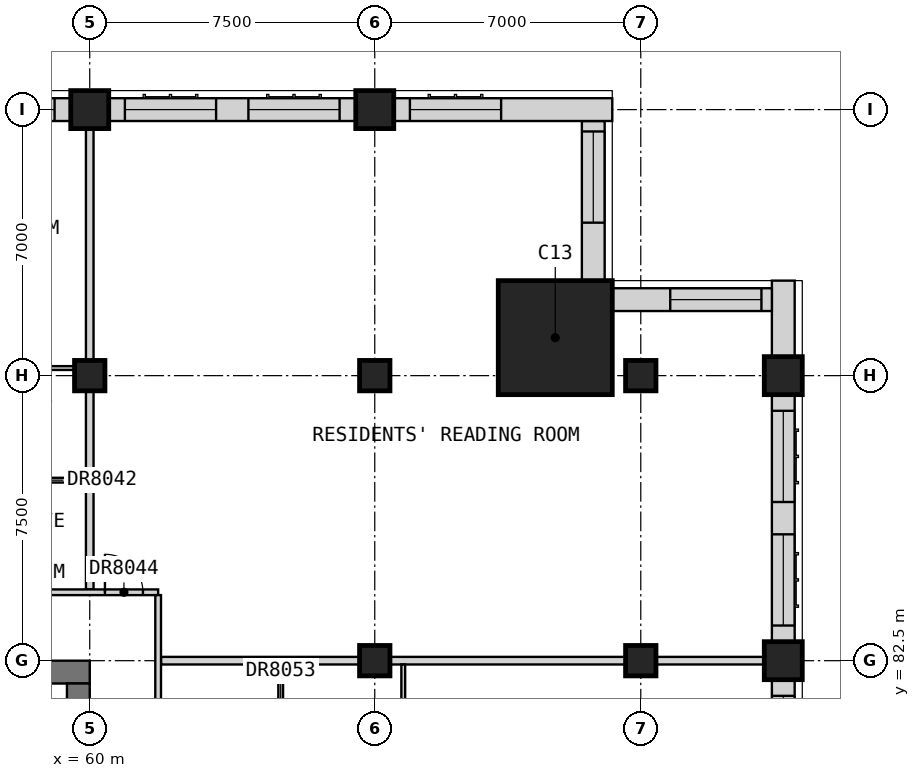
"""IFC4 building model, lengths in metres.
Left out: names, types, materials, properties, quantities, classifications, styles, units other than length and angle.
Written with IfcOpenShell. Run it as: python <this file> out.ifc"""

import sys

from ifc_helpers import new_model, si_unit, direction, frame, frame_2d, origin, origin_2d, place, context, subcontext, project, spatial, rectangle, extrude, element, fill, save


model = new_model("IFC4")
c1 = context("Model", 3, precision=1e-05, world=origin(), true_north=direction((0.0, 1.0)))
c2 = subcontext(c1, "Body", "Model", "MODEL_VIEW")
j1 = project(units=[si_unit("LENGTHUNIT", "METRE"), si_unit("PLANEANGLEUNIT", "RADIAN")], contexts=[c1])
p1 = place(None, origin())
s1 = spatial("IfcSite", under=j1, at=p1, CompositionType="ELEMENT")
p2 = place(p1, origin())
s2 = spatial("IfcBuilding", under=s1, at=p2, CompositionType="ELEMENT")
p3 = place(p2, frame((0.0, 0.0, 233.7)))
s3 = spatial("IfcBuildingStorey", under=s2, at=p3, CompositionType="ELEMENT", Elevation=233.7)
for number, where, z_axis, x_axis in (
    (1, (78.25, 82.5, 0.0), (0.0, 0.0, 1.0), (1.0, 0.0, 0.0)),
    (2, (78.25, 90.0, 0.0), (0.0, 0.0, 1.0), (1.0, 0.0, 0.0)),
):
    element("IfcColumn", number, at=place(p3, frame(where, z_axis=z_axis, x_axis=x_axis)), inside=s3, PredefinedType="COLUMN", context=c2, shape_type="SweptSolid", body=[
        extrude(rectangle(XDim=1.0, YDim=1.0, at=origin_2d()), origin(), (0.0, 0.0, 1.0), 3.5),
    ])
p4 = place(p3, frame((60.0, 90.0, 0.0), z_axis=(0.0, 0.0, 1.0), x_axis=(1.0, 0.0, 0.0)))
e3 = element("IfcColumn", 3, at=p4, inside=s3, PredefinedType="COLUMN", context=c2, shape_type="SweptSolid", body=[
    extrude(rectangle(XDim=0.8, YDim=0.8, at=origin_2d()), origin(), (0.0, 0.0, 1.0), 3.5),
])
p5 = place(p3, frame((60.0, 97.0, 0.0), z_axis=(0.0, 0.0, 1.0), x_axis=(1.0, 0.0, 0.0)))
e4 = element("IfcColumn", 4, at=p5, inside=s3, PredefinedType="COLUMN", context=c2, shape_type="SweptSolid", body=[
    extrude(rectangle(XDim=1.0, YDim=1.0, at=origin_2d()), origin(), (0.0, 0.0, 1.0), 3.5),
])
for number, where, z_axis, x_axis in (
    (5, (67.5, 82.5, 0.0), (0.0, 0.0, 1.0), (1.0, 0.0, 0.0)),
    (6, (67.5, 90.0, 0.0), (0.0, 0.0, 1.0), (1.0, 0.0, 0.0)),
):
    element("IfcColumn", number, at=place(p3, frame(where, z_axis=z_axis, x_axis=x_axis)), inside=s3, PredefinedType="COLUMN", context=c2, shape_type="SweptSolid", body=[
        extrude(rectangle(XDim=0.8, YDim=0.8, at=origin_2d()), origin(), (0.0, 0.0, 1.0), 3.5),
    ])
p6 = place(p3, frame((67.5, 97.0, 0.0), z_axis=(0.0, 0.0, 1.0), x_axis=(1.0, 0.0, 0.0)))
e7 = element("IfcColumn", 7, at=p6, inside=s3, PredefinedType="COLUMN", context=c2, shape_type="SweptSolid", body=[
    extrude(rectangle(XDim=1.0, YDim=1.0, at=origin_2d()), origin(), (0.0, 0.0, 1.0), 3.5),
])
for number, where, z_axis, x_axis in (
    (8, (74.5, 82.5, 0.0), (0.0, 0.0, 1.0), (1.0, 0.0, 0.0)),
    (9, (74.5, 90.0, 0.0), (0.0, 0.0, 1.0), (1.0, 0.0, 0.0)),
):
    element("IfcColumn", number, at=place(p3, frame(where, z_axis=z_axis, x_axis=x_axis)), inside=s3, PredefinedType="COLUMN", context=c2, shape_type="SweptSolid", body=[
        extrude(rectangle(XDim=0.8, YDim=0.8, at=origin_2d()), origin(), (0.0, 0.0, 1.0), 3.5),
    ])
p7 = place(p3, frame((72.25, 91.0, 0.0), z_axis=(0.0, 0.0, 1.0), x_axis=(1.0, 0.0, 0.0)))
e10 = element("IfcColumn", 10, at=p7, inside=s3, PredefinedType="COLUMN", context=c2, shape_type="SweptSolid", body=[
    extrude(rectangle(XDim=3.0, YDim=3.0, at=origin_2d()), origin(), (0.0, 0.0, 1.0), 3.5),
])
p8 = place(p3, frame((30.0, 82.2, 0.0), z_axis=(0.0, 0.0, 1.0), x_axis=(1.0, 0.0, 0.0)))
e11 = element("IfcWall", 11, at=p8, inside=s3, PredefinedType="SHEAR", context=c2, shape_type="SweptSolid", body=[
    extrude(rectangle(XDim=30.0, YDim=0.6, at=frame_2d((15.0, 0.0))), origin(), (0.0, 0.0, 1.0), 3.5),
])
p9 = place(p3, frame((59.7, 60.6, 0.0), z_axis=(0.0, 0.0, 1.0), x_axis=(0.0, 1.0, 0.0)))
e12 = element("IfcWall", 12, at=p9, inside=s3, PredefinedType="SHEAR", context=c2, shape_type="SweptSolid", body=[
    extrude(rectangle(XDim=21.3, YDim=0.6, at=frame_2d((10.65, 0.0))), origin(), (0.0, 0.0, 1.0), 3.5),
])
p10 = place(p9, frame((14.9, 0.0, 0.0)))
e13 = element("IfcOpeningElement", 13, at=p10, cuts=e12, PredefinedType="OPENING", context=c2, shape_type="SweptSolid", body=[
    extrude(rectangle(XDim=1.8, YDim=2.1, at=frame_2d((0.9, 1.05))), frame((0.0, 0.31, 0.0), z_axis=(0.0, -1.0, 0.0), x_axis=(1.0, 0.0, 0.0)), (0.0, 0.0, 1.0), 0.62),
])
p11 = place(p3, frame((78.25, 75.5, 0.0), z_axis=(0.0, 0.0, 1.0), x_axis=(0.0, 1.0, 0.0)))
e14 = element("IfcWall", 14, at=p11, inside=s3, PredefinedType="SOLIDWALL", context=c2, shape_type="SweptSolid", body=[
    extrude(rectangle(XDim=6.5, YDim=0.6, at=frame_2d((3.25, 0.0))), origin(), (0.0, 0.0, 1.0), 2.75),
])
p12 = place(p11, frame((0.425, 0.0, 0.8)))
e15 = element("IfcOpeningElement", 15, at=p12, cuts=e14, PredefinedType="OPENING", context=c2, shape_type="SweptSolid", body=[
    extrude(rectangle(XDim=2.4, YDim=1.8, at=frame_2d((1.2, 0.9))), frame((0.0, 0.31, 0.0), z_axis=(0.0, -1.0, 0.0), x_axis=(1.0, 0.0, 0.0)), (0.0, 0.0, 1.0), 0.62),
])
p13 = place(p11, frame((3.675, 0.0, 0.8)))
e16 = element("IfcOpeningElement", 16, at=p13, cuts=e14, PredefinedType="OPENING", context=c2, shape_type="SweptSolid", body=[
    extrude(rectangle(XDim=2.4, YDim=1.8, at=frame_2d((1.2, 0.9))), frame((0.0, 0.31, 0.0), z_axis=(0.0, -1.0, 0.0), x_axis=(1.0, 0.0, 0.0)), (0.0, 0.0, 1.0), 0.62),
])
p14 = place(p3, frame((78.25, 83.0, 0.0), z_axis=(0.0, 0.0, 1.0), x_axis=(0.0, 1.0, 0.0)))
e17 = element("IfcWall", 17, at=p14, inside=s3, PredefinedType="SOLIDWALL", context=c2, shape_type="SweptSolid", body=[
    extrude(rectangle(XDim=6.5, YDim=0.6, at=frame_2d((3.25, 0.0))), origin(), (0.0, 0.0, 1.0), 2.75),
])
p15 = place(p14, frame((0.425, 0.0, 0.8)))
e18 = element("IfcOpeningElement", 18, at=p15, cuts=e17, PredefinedType="OPENING", context=c2, shape_type="SweptSolid", body=[
    extrude(rectangle(XDim=2.4, YDim=1.8, at=frame_2d((1.2, 0.9))), frame((0.0, 0.31, 0.0), z_axis=(0.0, -1.0, 0.0), x_axis=(1.0, 0.0, 0.0)), (0.0, 0.0, 1.0), 0.62),
])
p16 = place(p14, frame((3.675, 0.0, 0.8)))
e19 = element("IfcOpeningElement", 19, at=p16, cuts=e17, PredefinedType="OPENING", context=c2, shape_type="SweptSolid", body=[
    extrude(rectangle(XDim=2.4, YDim=1.8, at=frame_2d((1.2, 0.9))), frame((0.0, 0.31, 0.0), z_axis=(0.0, -1.0, 0.0), x_axis=(1.0, 0.0, 0.0)), (0.0, 0.0, 1.0), 0.62),
])
p17 = place(p3, frame((78.25, 90.5, 0.0), z_axis=(0.0, 0.0, 1.0), x_axis=(0.0, 1.0, 0.0)))
e20 = element("IfcWall", 20, at=p17, inside=s3, PredefinedType="SOLIDWALL", context=c2, shape_type="SweptSolid", body=[
    extrude(rectangle(XDim=2.0, YDim=0.6, at=frame_2d((1.0, 0.0))), origin(), (0.0, 0.0, 1.0), 3.25),
])
p18 = place(p3, frame((77.95, 92.0, 0.0), z_axis=(0.0, 0.0, 1.0), x_axis=(-1.0, 0.0, 0.0)))
e21 = element("IfcWall", 21, at=p18, inside=s3, PredefinedType="SOLIDWALL", context=c2, shape_type="SweptSolid", body=[
    extrude(rectangle(XDim=4.2, YDim=0.6, at=frame_2d((2.1, 0.0))), origin(), (0.0, 0.0, 1.0), 3.25),
])
p19 = place(p18, frame((0.275, 0.0, 0.8)))
e22 = element("IfcOpeningElement", 22, at=p19, cuts=e21, PredefinedType="OPENING", context=c2, shape_type="SweptSolid", body=[
    extrude(rectangle(XDim=2.4, YDim=1.8, at=frame_2d((1.2, 0.9))), frame((0.0, 0.31, 0.0), z_axis=(0.0, -1.0, 0.0), x_axis=(1.0, 0.0, 0.0)), (0.0, 0.0, 1.0), 0.62),
])
p20 = place(p3, frame((73.25, 92.5, 0.0), z_axis=(0.0, 0.0, 1.0), x_axis=(0.0, 1.0, 0.0)))
e23 = element("IfcWall", 23, at=p20, inside=s3, PredefinedType="SOLIDWALL", context=c2, shape_type="SweptSolid", body=[
    extrude(rectangle(XDim=4.2, YDim=0.6, at=frame_2d((2.1, 0.0))), origin(), (0.0, 0.0, 1.0), 3.25),
])
p21 = place(p20, frame((1.525, 0.0, 0.8)))
e24 = element("IfcOpeningElement", 24, at=p21, cuts=e23, PredefinedType="OPENING", context=c2, shape_type="SweptSolid", body=[
    extrude(rectangle(XDim=2.4, YDim=1.8, at=frame_2d((1.2, 0.9))), frame((0.0, 0.31, 0.0), z_axis=(0.0, -1.0, 0.0), x_axis=(1.0, 0.0, 0.0)), (0.0, 0.0, 1.0), 0.62),
])
p22 = place(p3, frame((73.75, 97.0, 0.0), z_axis=(0.0, 0.0, 1.0), x_axis=(-1.0, 0.0, 0.0)))
e25 = element("IfcWall", 25, at=p22, inside=s3, PredefinedType="SOLIDWALL", context=c2, shape_type="SweptSolid", body=[
    extrude(rectangle(XDim=5.75, YDim=0.6, at=frame_2d((2.875, 0.0))), origin(), (0.0, 0.0, 1.0), 2.75),
])
p23 = place(p22, frame((2.925, 0.0, 0.8)))
e26 = element("IfcOpeningElement", 26, at=p23, cuts=e25, PredefinedType="OPENING", context=c2, shape_type="SweptSolid", body=[
    extrude(rectangle(XDim=2.4, YDim=1.8, at=frame_2d((1.2, 0.9))), frame((0.0, 0.31, 0.0), z_axis=(0.0, -1.0, 0.0), x_axis=(1.0, 0.0, 0.0)), (0.0, 0.0, 1.0), 0.62),
])
p24 = place(p3, frame((67.0, 97.0, 0.0), z_axis=(0.0, 0.0, 1.0), x_axis=(-1.0, 0.0, 0.0)))
e27 = element("IfcWall", 27, at=p24, inside=s3, PredefinedType="SOLIDWALL", context=c2, shape_type="SweptSolid", body=[
    extrude(rectangle(XDim=6.5, YDim=0.6, at=frame_2d((3.25, 0.0))), origin(), (0.0, 0.0, 1.0), 2.75),
])
p25 = place(p24, frame((3.675, 0.0, 0.8)))
e28 = element("IfcOpeningElement", 28, at=p25, cuts=e27, PredefinedType="OPENING", context=c2, shape_type="SweptSolid", body=[
    extrude(rectangle(XDim=2.4, YDim=1.8, at=frame_2d((1.2, 0.9))), frame((0.0, 0.31, 0.0), z_axis=(0.0, -1.0, 0.0), x_axis=(1.0, 0.0, 0.0)), (0.0, 0.0, 1.0), 0.62),
])
p26 = place(p24, frame((0.425, 0.0, 0.8)))
e29 = element("IfcOpeningElement", 29, at=p26, cuts=e27, PredefinedType="OPENING", context=c2, shape_type="SweptSolid", body=[
    extrude(rectangle(XDim=2.4, YDim=1.8, at=frame_2d((1.2, 0.9))), frame((0.0, 0.31, 0.0), z_axis=(0.0, -1.0, 0.0), x_axis=(1.0, 0.0, 0.0)), (0.0, 0.0, 1.0), 0.62),
])
p27 = place(p3, frame((59.5, 97.0, 0.0), z_axis=(0.0, 0.0, 1.0), x_axis=(-1.0, 0.0, 0.0)))
e30 = element("IfcWall", 30, at=p27, inside=s3, PredefinedType="SOLIDWALL", context=c2, shape_type="SweptSolid", body=[
    extrude(rectangle(XDim=6.5, YDim=0.6, at=frame_2d((3.25, 0.0))), origin(), (0.0, 0.0, 1.0), 2.75),
])
p28 = place(p27, frame((3.675, 0.0, 0.8)))
e31 = element("IfcOpeningElement", 31, at=p28, cuts=e30, PredefinedType="OPENING", context=c2, shape_type="SweptSolid", body=[
    extrude(rectangle(XDim=2.4, YDim=1.8, at=frame_2d((1.2, 0.9))), frame((0.0, 0.31, 0.0), z_axis=(0.0, -1.0, 0.0), x_axis=(1.0, 0.0, 0.0)), (0.0, 0.0, 1.0), 0.62),
])
p29 = place(p27, frame((0.425, 0.0, 0.8)))
e32 = element("IfcOpeningElement", 32, at=p29, cuts=e30, PredefinedType="OPENING", context=c2, shape_type="SweptSolid", body=[
    extrude(rectangle(XDim=2.4, YDim=1.8, at=frame_2d((1.2, 0.9))), frame((0.0, 0.31, 0.0), z_axis=(0.0, -1.0, 0.0), x_axis=(1.0, 0.0, 0.0)), (0.0, 0.0, 1.0), 0.62),
])
p30 = place(p3, frame((61.875, 82.5, 0.0), z_axis=(0.0, 0.0, 1.0), x_axis=(1.0, 0.0, 0.0)))
e33 = element("IfcWall", 33, at=p30, inside=s3, PredefinedType="PARTITIONING", context=c2, shape_type="SweptSolid", body=[
    extrude(rectangle(XDim=16.875, YDim=0.2, at=frame_2d((8.438, 0.0))), origin(), (0.0, 0.0, 1.0), 3.25),
])
p31 = place(p3, frame((60.0, 84.375, 0.0), z_axis=(0.0, 0.0, 1.0), x_axis=(0.0, 1.0, 0.0)))
e34 = element("IfcWall", 34, at=p31, inside=s3, PredefinedType="PARTITIONING", context=c2, shape_type="SweptSolid", body=[
    extrude(rectangle(XDim=13.125, YDim=0.2, at=frame_2d((6.562, 0.0))), origin(), (0.0, 0.0, 1.0), 3.25),
])
p32 = place(p3, frame((33.85, 84.3, 0.0), z_axis=(0.0, 0.0, 1.0), x_axis=(1.0, 0.0, 0.0)))
e35 = element("IfcWall", 35, at=p32, inside=s3, PredefinedType="PARTITIONING", context=c2, shape_type="SweptSolid", body=[
    extrude(rectangle(XDim=27.95, YDim=0.15, at=frame_2d((13.975, 0.0))), origin(), (0.0, 0.0, 1.0), 3.25),
])
p33 = place(p32, frame((1.325, 0.0, 0.0)))
e36 = element("IfcOpeningElement", 36, at=p33, cuts=e35, PredefinedType="OPENING", context=c2, shape_type="SweptSolid", body=[
    extrude(rectangle(XDim=0.9, YDim=2.1, at=frame_2d((0.45, 1.05))), frame((0.0, 0.085, 0.0), z_axis=(0.0, -1.0, 0.0), x_axis=(1.0, 0.0, 0.0)), (0.0, 0.0, 1.0), 0.17),
])
p34 = place(p32, frame((8.825, 0.0, 0.0)))
e37 = element("IfcOpeningElement", 37, at=p34, cuts=e35, PredefinedType="OPENING", context=c2, shape_type="SweptSolid", body=[
    extrude(rectangle(XDim=0.9, YDim=2.1, at=frame_2d((0.45, 1.05))), frame((0.0, 0.085, 0.0), z_axis=(0.0, -1.0, 0.0), x_axis=(1.0, 0.0, 0.0)), (0.0, 0.0, 1.0), 0.17),
])
p35 = place(p32, frame((16.325, 0.0, 0.0)))
e38 = element("IfcOpeningElement", 38, at=p35, cuts=e35, PredefinedType="OPENING", context=c2, shape_type="SweptSolid", body=[
    extrude(rectangle(XDim=0.9, YDim=2.1, at=frame_2d((0.45, 1.05))), frame((0.0, 0.085, 0.0), z_axis=(0.0, -1.0, 0.0), x_axis=(1.0, 0.0, 0.0)), (0.0, 0.0, 1.0), 0.17),
])
p36 = place(p32, frame((26.55, 0.0, 0.0)))
e39 = element("IfcOpeningElement", 39, at=p36, cuts=e35, PredefinedType="OPENING", context=c2, shape_type="SweptSolid", body=[
    extrude(rectangle(XDim=1.0, YDim=2.1, at=frame_2d((0.5, 1.05))), frame((0.0, 0.085, 0.0), z_axis=(0.0, -1.0, 0.0), x_axis=(1.0, 0.0, 0.0)), (0.0, 0.0, 1.0), 0.17),
])
p37 = place(p3, frame((61.8, 58.275, 0.0), z_axis=(0.0, 0.0, 1.0), x_axis=(0.0, 1.0, 0.0)))
e40 = element("IfcWall", 40, at=p37, inside=s3, PredefinedType="PARTITIONING", context=c2, shape_type="SweptSolid", body=[
    extrude(rectangle(XDim=25.95, YDim=0.15, at=frame_2d((12.975, 0.0))), origin(), (0.0, 0.0, 1.0), 3.25),
])
p38 = place(p37, frame((4.575, 0.0, 0.0)))
e41 = element("IfcOpeningElement", 41, at=p38, cuts=e40, PredefinedType="OPENING", context=c2, shape_type="SweptSolid", body=[
    extrude(rectangle(XDim=1.8, YDim=2.1, at=frame_2d((0.9, 1.05))), frame((0.0, 0.085, 0.0), z_axis=(0.0, -1.0, 0.0), x_axis=(1.0, 0.0, 0.0)), (0.0, 0.0, 1.0), 0.17),
])
p39 = place(p37, frame((14.4, 0.0, 0.0)))
e42 = element("IfcOpeningElement", 42, at=p39, cuts=e40, PredefinedType="OPENING", context=c2, shape_type="SweptSolid", body=[
    extrude(rectangle(XDim=0.9, YDim=2.1, at=frame_2d((0.45, 1.05))), frame((0.0, 0.085, 0.0), z_axis=(0.0, -1.0, 0.0), x_axis=(1.0, 0.0, 0.0)), (0.0, 0.0, 1.0), 0.17),
])
p40 = place(p3, frame((33.85, 90.2, 0.0), z_axis=(0.0, 0.0, 1.0), x_axis=(1.0, 0.0, 0.0)))
e43 = element("IfcWall", 43, at=p40, inside=s3, PredefinedType="PARTITIONING", context=c2, shape_type="SweptSolid", body=[
    extrude(rectangle(XDim=26.05, YDim=0.1, at=frame_2d((13.025, 0.0))), origin(), (0.0, 0.0, 1.0), 3.25),
])
p41 = place(p40, frame((0.175, 0.0, 0.0)))
e44 = element("IfcOpeningElement", 44, at=p41, cuts=e43, PredefinedType="OPENING", context=c2, shape_type="SweptSolid", body=[
    extrude(rectangle(XDim=0.9, YDim=2.1, at=frame_2d((0.45, 1.05))), frame((0.0, 0.06, 0.0), z_axis=(0.0, -1.0, 0.0), x_axis=(1.0, 0.0, 0.0)), (0.0, 0.0, 1.0), 0.12),
])
p42 = place(p40, frame((8.825, 0.0, 0.0)))
e45 = element("IfcOpeningElement", 45, at=p42, cuts=e43, PredefinedType="OPENING", context=c2, shape_type="SweptSolid", body=[
    extrude(rectangle(XDim=0.9, YDim=2.1, at=frame_2d((0.45, 1.05))), frame((0.0, 0.06, 0.0), z_axis=(0.0, -1.0, 0.0), x_axis=(1.0, 0.0, 0.0)), (0.0, 0.0, 1.0), 0.12),
])
p43 = place(p40, frame((16.325, 0.0, 0.0)))
e46 = element("IfcOpeningElement", 46, at=p43, cuts=e43, PredefinedType="OPENING", context=c2, shape_type="SweptSolid", body=[
    extrude(rectangle(XDim=0.9, YDim=2.1, at=frame_2d((0.45, 1.05))), frame((0.0, 0.06, 0.0), z_axis=(0.0, -1.0, 0.0), x_axis=(1.0, 0.0, 0.0)), (0.0, 0.0, 1.0), 0.12),
])
p44 = place(p40, frame((23.825, 0.0, 0.0)))
e47 = element("IfcOpeningElement", 47, at=p44, cuts=e43, PredefinedType="OPENING", context=c2, shape_type="SweptSolid", body=[
    extrude(rectangle(XDim=0.9, YDim=2.1, at=frame_2d((0.45, 1.05))), frame((0.0, 0.06, 0.0), z_axis=(0.0, -1.0, 0.0), x_axis=(1.0, 0.0, 0.0)), (0.0, 0.0, 1.0), 0.12),
])
p45 = place(p3, frame((68.25, 67.6, 0.0), z_axis=(0.0, 0.0, 1.0), x_axis=(0.0, 1.0, 0.0)))
e48 = element("IfcWall", 48, at=p45, inside=s3, PredefinedType="PARTITIONING", context=c2, shape_type="SweptSolid", body=[
    extrude(rectangle(XDim=14.8, YDim=0.1, at=frame_2d((7.4, 0.0))), origin(), (0.0, 0.0, 1.0), 3.25),
])
p46 = place(p45, frame((1.325, 0.0, 0.0)))
e49 = element("IfcOpeningElement", 49, at=p46, cuts=e48, PredefinedType="OPENING", context=c2, shape_type="SweptSolid", body=[
    extrude(rectangle(XDim=0.9, YDim=2.1, at=frame_2d((0.45, 1.05))), frame((0.0, 0.06, 0.0), z_axis=(0.0, -1.0, 0.0), x_axis=(1.0, 0.0, 0.0)), (0.0, 0.0, 1.0), 0.12),
])
p47 = place(p45, frame((5.075, 0.0, 0.0)))
e50 = element("IfcOpeningElement", 50, at=p47, cuts=e48, PredefinedType="OPENING", context=c2, shape_type="SweptSolid", body=[
    extrude(rectangle(XDim=0.9, YDim=2.1, at=frame_2d((0.45, 1.05))), frame((0.0, 0.06, 0.0), z_axis=(0.0, -1.0, 0.0), x_axis=(1.0, 0.0, 0.0)), (0.0, 0.0, 1.0), 0.12),
])
p48 = place(p45, frame((12.575, 0.0, 0.0)))
e51 = element("IfcOpeningElement", 51, at=p48, cuts=e48, PredefinedType="OPENING", context=c2, shape_type="SweptSolid", body=[
    extrude(rectangle(XDim=0.9, YDim=2.1, at=frame_2d((0.45, 1.05))), frame((0.0, 0.06, 0.0), z_axis=(0.0, -1.0, 0.0), x_axis=(1.0, 0.0, 0.0)), (0.0, 0.0, 1.0), 0.12),
])
p49 = place(p3, frame((52.5, 87.25, 0.0), z_axis=(0.0, 0.0, 1.0), x_axis=(1.0, 0.0, 0.0)))
e52 = element("IfcWall", 52, at=p49, inside=s3, PredefinedType="PARTITIONING", context=c2, shape_type="SweptSolid", body=[
    extrude(rectangle(XDim=7.4, YDim=0.125, at=frame_2d((3.7, 0.0))), origin(), (0.0, 0.0, 1.0), 3.25),
])
p50 = place(p49, frame((5.175, 0.0, 0.0)))
e53 = element("IfcOpeningElement", 53, at=p50, cuts=e52, PredefinedType="OPENING", context=c2, shape_type="SweptSolid", body=[
    extrude(rectangle(XDim=0.9, YDim=2.1, at=frame_2d((0.45, 1.05))), frame((0.0, 0.073, 0.0), z_axis=(0.0, -1.0, 0.0), x_axis=(1.0, 0.0, 0.0)), (0.0, 0.0, 1.0), 0.145),
])
p51 = place(p3, frame((65.025, 75.062, 0.0), z_axis=(0.0, 0.0, 1.0), x_axis=(0.0, 1.0, 0.0)))
e54 = element("IfcWall", 54, at=p51, inside=s3, PredefinedType="PARTITIONING", context=c2, shape_type="SweptSolid", body=[
    extrude(rectangle(XDim=7.337, YDim=0.125, at=frame_2d((3.669, 0.0))), origin(), (0.0, 0.0, 1.0), 3.25),
])
p52 = place(p51, frame((5.113, 0.0, 0.0)))
e55 = element("IfcOpeningElement", 55, at=p52, cuts=e54, PredefinedType="OPENING", context=c2, shape_type="SweptSolid", body=[
    extrude(rectangle(XDim=0.9, YDim=2.1, at=frame_2d((0.45, 1.05))), frame((0.0, 0.073, 0.0), z_axis=(0.0, -1.0, 0.0), x_axis=(1.0, 0.0, 0.0)), (0.0, 0.0, 1.0), 0.145),
])
p53 = place(p13, origin())
e56 = element("IfcWindow", 56, at=p53, inside=s3, PartitioningType="SINGLE_PANEL", PredefinedType="WINDOW", context=c2, shape_type="SweptSolid", body=[
    extrude(rectangle(XDim=2.4, YDim=1.8, at=frame_2d((1.2, 0.9))), frame((0.0, -0.07, 0.0), z_axis=(0.0, -1.0, 0.0), x_axis=(1.0, 0.0, 0.0)), (0.0, 0.0, 1.0), 0.06),
])
fill(e16, e56)
p54 = place(p15, origin())
e57 = element("IfcWindow", 57, at=p54, inside=s3, PartitioningType="SINGLE_PANEL", PredefinedType="WINDOW", context=c2, shape_type="SweptSolid", body=[
    extrude(rectangle(XDim=2.4, YDim=1.8, at=frame_2d((1.2, 0.9))), frame((0.0, -0.07, 0.0), z_axis=(0.0, -1.0, 0.0), x_axis=(1.0, 0.0, 0.0)), (0.0, 0.0, 1.0), 0.06),
])
fill(e18, e57)
p55 = place(p16, origin())
e58 = element("IfcWindow", 58, at=p55, inside=s3, PartitioningType="SINGLE_PANEL", PredefinedType="WINDOW", context=c2, shape_type="SweptSolid", body=[
    extrude(rectangle(XDim=2.4, YDim=1.8, at=frame_2d((1.2, 0.9))), frame((0.0, -0.07, 0.0), z_axis=(0.0, -1.0, 0.0), x_axis=(1.0, 0.0, 0.0)), (0.0, 0.0, 1.0), 0.06),
])
fill(e19, e58)
p56 = place(p19, origin())
e59 = element("IfcWindow", 59, at=p56, inside=s3, PartitioningType="SINGLE_PANEL", PredefinedType="WINDOW", context=c2, shape_type="SweptSolid", body=[
    extrude(rectangle(XDim=2.4, YDim=1.8, at=frame_2d((1.2, 0.9))), frame((0.0, -0.07, 0.0), z_axis=(0.0, -1.0, 0.0), x_axis=(1.0, 0.0, 0.0)), (0.0, 0.0, 1.0), 0.06),
])
fill(e22, e59)
p57 = place(p21, origin())
e60 = element("IfcWindow", 60, at=p57, inside=s3, PartitioningType="SINGLE_PANEL", PredefinedType="WINDOW", context=c2, shape_type="SweptSolid", body=[
    extrude(rectangle(XDim=2.4, YDim=1.8, at=frame_2d((1.2, 0.9))), frame((0.0, -0.07, 0.0), z_axis=(0.0, -1.0, 0.0), x_axis=(1.0, 0.0, 0.0)), (0.0, 0.0, 1.0), 0.06),
])
fill(e24, e60)
p58 = place(p23, origin())
e61 = element("IfcWindow", 61, at=p58, inside=s3, PartitioningType="SINGLE_PANEL", PredefinedType="WINDOW", context=c2, shape_type="SweptSolid", body=[
    extrude(rectangle(XDim=2.4, YDim=1.8, at=frame_2d((1.2, 0.9))), frame((0.0, -0.07, 0.0), z_axis=(0.0, -1.0, 0.0), x_axis=(1.0, 0.0, 0.0)), (0.0, 0.0, 1.0), 0.06),
])
fill(e26, e61)
p59 = place(p25, origin())
e62 = element("IfcWindow", 62, at=p59, inside=s3, PartitioningType="SINGLE_PANEL", PredefinedType="WINDOW", context=c2, shape_type="SweptSolid", body=[
    extrude(rectangle(XDim=2.4, YDim=1.8, at=frame_2d((1.2, 0.9))), frame((0.0, -0.07, 0.0), z_axis=(0.0, -1.0, 0.0), x_axis=(1.0, 0.0, 0.0)), (0.0, 0.0, 1.0), 0.06),
])
fill(e28, e62)
p60 = place(p26, origin())
e63 = element("IfcWindow", 63, at=p60, inside=s3, PartitioningType="SINGLE_PANEL", PredefinedType="WINDOW", context=c2, shape_type="SweptSolid", body=[
    extrude(rectangle(XDim=2.4, YDim=1.8, at=frame_2d((1.2, 0.9))), frame((0.0, -0.07, 0.0), z_axis=(0.0, -1.0, 0.0), x_axis=(1.0, 0.0, 0.0)), (0.0, 0.0, 1.0), 0.06),
])
fill(e29, e63)
p61 = place(p29, origin())
e64 = element("IfcWindow", 64, at=p61, inside=s3, PartitioningType="SINGLE_PANEL", PredefinedType="WINDOW", context=c2, shape_type="SweptSolid", body=[
    extrude(rectangle(XDim=2.4, YDim=1.8, at=frame_2d((1.2, 0.9))), frame((0.0, -0.07, 0.0), z_axis=(0.0, -1.0, 0.0), x_axis=(1.0, 0.0, 0.0)), (0.0, 0.0, 1.0), 0.06),
])
fill(e32, e64)
p62 = place(p36, origin())
e65 = element("IfcDoor", 65, at=p62, inside=s3, OperationType="SINGLE_SWING_LEFT", PredefinedType="DOOR", context=c2, shape_type="SweptSolid", body=[
    extrude(rectangle(XDim=1.0, YDim=2.1, at=frame_2d((0.5, 1.05))), frame((0.0, 0.025, 0.0), z_axis=(0.0, -1.0, 0.0), x_axis=(1.0, 0.0, 0.0)), (0.0, 0.0, 1.0), 0.05),
])
fill(e39, e65)
save(model, sys.argv[1])
